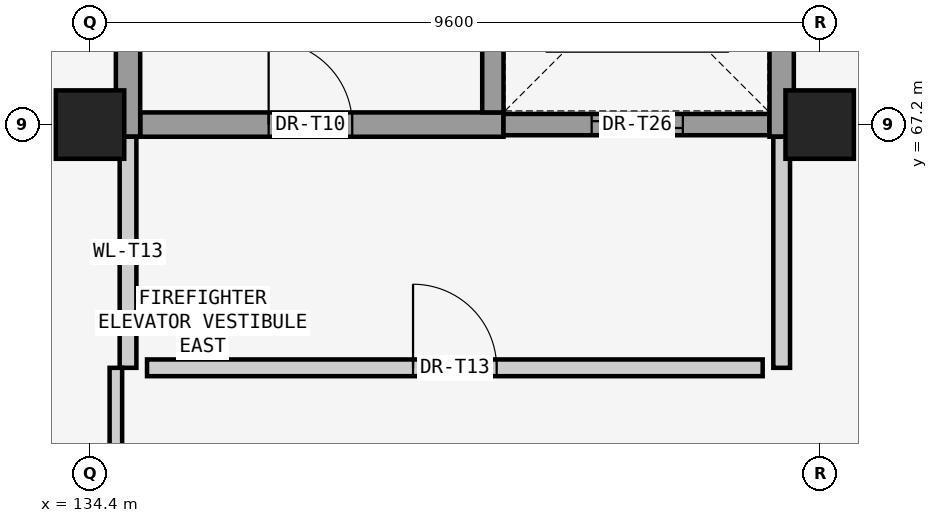
"""IFC4 building model, lengths in metres.
Left out: names, types, materials, properties, quantities, classifications, styles, units other than length and angle.
Written with IfcOpenShell. Run it as: python <this file> out.ifc"""

import sys

from ifc_helpers import new_model, si_unit, direction, frame, frame_2d, origin, origin_2d, place, context, subcontext, project, spatial, rectangle, extrude, element, fill, save


model = new_model("IFC4")
c1 = context("Model", 3, precision=1e-05, world=origin(), true_north=direction((0.0, 1.0)))
c2 = subcontext(c1, "Body", "Model", "MODEL_VIEW")
j1 = project(units=[si_unit("LENGTHUNIT", "METRE"), si_unit("PLANEANGLEUNIT", "RADIAN")], contexts=[c1])
p1 = place(None, origin())
s1 = spatial("IfcSite", under=j1, at=p1, CompositionType="ELEMENT")
p2 = place(p1, origin())
s2 = spatial("IfcBuilding", under=s1, at=p2, CompositionType="ELEMENT")
p3 = place(p2, frame((0.0, 0.0, -4.8)))
s3 = spatial("IfcBuildingStorey", under=s2, at=p3, CompositionType="ELEMENT", Elevation=-4.8)
for number, where, z_axis, x_axis in (
    (1, (134.4, 67.2, 0.0), (0.0, 0.0, 1.0), (1.0, 0.0, 0.0)),
    (2, (144.0, 67.2, 0.0), (0.0, 0.0, 1.0), (1.0, 0.0, 0.0)),
):
    element("IfcColumn", number, at=place(p3, frame(where, z_axis=z_axis, x_axis=x_axis)), inside=s3, PredefinedType="COLUMN", context=c2, shape_type="SweptSolid", body=[
        extrude(rectangle(XDim=0.9, YDim=0.9, at=origin_2d()), origin(), (0.0, 0.0, 1.0), 4.38),
    ])
p4 = place(p3, frame((135.06, 67.2, 0.0), z_axis=(0.0, 0.0, 1.0), x_axis=(1.0, 0.0, 0.0)))
e3 = element("IfcWall", 3, at=p4, inside=s3, PredefinedType="SHEAR", context=c2, shape_type="SweptSolid", body=[
    extrude(rectangle(XDim=4.78, YDim=0.32, at=frame_2d((2.39, 0.0))), origin(), (0.0, 0.0, 1.0), 4.36),
])
p5 = place(p4, frame((1.69, 0.0, 0.0)))
e4 = element("IfcOpeningElement", 4, at=p5, cuts=e3, PredefinedType="OPENING", context=c2, shape_type="SweptSolid", body=[
    extrude(rectangle(XDim=1.1, YDim=2.2, at=frame_2d((0.55, 1.1))), frame((0.0, 0.17, 0.0), z_axis=(0.0, -1.0, 0.0), x_axis=(1.0, 0.0, 0.0)), (0.0, 0.0, 1.0), 0.34),
])
p6 = place(p3, frame((139.84, 67.2, 0.0), z_axis=(0.0, 0.0, 1.0), x_axis=(1.0, 0.0, 0.0)))
e5 = element("IfcWall", 5, at=p6, inside=s3, PredefinedType="SHEAR", context=c2, shape_type="SweptSolid", body=[
    extrude(rectangle(XDim=3.5, YDim=0.28, at=frame_2d((1.75, 0.0))), origin(), (0.0, 0.0, 1.0), 4.36),
])
p7 = place(p6, frame((1.16, 0.0, 0.0)))
e6 = element("IfcOpeningElement", 6, at=p7, cuts=e5, PredefinedType="OPENING", context=c2, shape_type="SweptSolid", body=[
    extrude(rectangle(XDim=1.2, YDim=2.2, at=frame_2d((0.6, 1.1))), frame((0.0, 0.15, 0.0), z_axis=(0.0, -1.0, 0.0), x_axis=(1.0, 0.0, 0.0)), (0.0, 0.0, 1.0), 0.3),
])
for number, where, z_axis, x_axis in (
    (7, (134.9, 75.4, 0.0), (0.0, 0.0, 1.0), (0.0, -1.0, 0.0)),
    (8, (143.5, 67.04, 0.0), (0.0, 0.0, 1.0), (0.0, 1.0, 0.0)),
):
    element("IfcWall", number, at=place(p3, frame(where, z_axis=z_axis, x_axis=x_axis)), inside=s3, PredefinedType="SHEAR", context=c2, shape_type="SweptSolid", body=[
        extrude(rectangle(XDim=8.36, YDim=0.32, at=frame_2d((4.18, 0.0))), origin(), (0.0, 0.0, 1.0), 4.36),
    ])
p8 = place(p3, frame((139.7, 67.36, 0.0), z_axis=(0.0, 0.0, 1.0), x_axis=(0.0, 1.0, 0.0)))
e9 = element("IfcWall", 9, at=p8, inside=s3, PredefinedType="SHEAR", context=c2, shape_type="SweptSolid", body=[
    extrude(rectangle(XDim=7.72, YDim=0.28, at=frame_2d((3.86, 0.0))), origin(), (0.0, 0.0, 1.0), 4.36),
])
for number, where, z_axis, x_axis in (
    (10, (134.9, 64.0, 0.0), (0.0, 0.0, 1.0), (0.0, 1.0, 0.0)),
    (11, (143.5, 64.0, 0.0), (0.0, 0.0, 1.0), (0.0, 1.0, 0.0)),
):
    element("IfcWall", number, at=place(p3, frame(where, z_axis=z_axis, x_axis=x_axis)), inside=s3, PredefinedType="SOLIDWALL", context=c2, shape_type="SweptSolid", body=[
        extrude(rectangle(XDim=3.04, YDim=0.22, at=frame_2d((1.52, 0.0))), origin(), (0.0, 0.0, 1.0), 4.32),
    ])
p9 = place(p3, frame((135.15, 64.0, 0.0), z_axis=(0.0, 0.0, 1.0), x_axis=(1.0, 0.0, 0.0)))
e12 = element("IfcWall", 12, at=p9, inside=s3, PredefinedType="SOLIDWALL", context=c2, shape_type="SweptSolid", body=[
    extrude(rectangle(XDim=8.1, YDim=0.22, at=frame_2d((4.05, 0.0))), origin(), (0.0, 0.0, 1.0), 4.32),
])
p10 = place(p9, frame((3.5, 0.0, 0.0)))
e13 = element("IfcOpeningElement", 13, at=p10, cuts=e12, PredefinedType="OPENING", context=c2, shape_type="SweptSolid", body=[
    extrude(rectangle(XDim=1.1, YDim=2.2, at=frame_2d((0.55, 1.1))), frame((0.0, 0.12, 0.0), z_axis=(0.0, -1.0, 0.0), x_axis=(1.0, 0.0, 0.0)), (0.0, 0.0, 1.0), 0.24),
])
p11 = place(p3, frame((134.74, 60.4, 0.0), z_axis=(0.0, 0.0, 1.0), x_axis=(0.0, 1.0, 0.0)))
e14 = element("IfcWall", 14, at=p11, inside=s3, PredefinedType="PARTITIONING", context=c2, shape_type="SweptSolid", body=[
    extrude(rectangle(XDim=3.6, YDim=0.165, at=frame_2d((1.8, 0.0))), origin(), (0.0, 0.0, 1.0), 4.33),
])
p12 = place(p5, origin())
e15 = element("IfcDoor", 15, at=p12, inside=s3, OperationType="SINGLE_SWING_LEFT", PredefinedType="DOOR", context=c2, shape_type="SweptSolid", body=[
    extrude(rectangle(XDim=1.1, YDim=2.2, at=frame_2d((0.55, 1.1))), frame((0.0, 0.025, 0.0), z_axis=(0.0, -1.0, 0.0), x_axis=(1.0, 0.0, 0.0)), (0.0, 0.0, 1.0), 0.05),
])
fill(e4, e15)
p13 = place(p7, origin())
e16 = element("IfcDoor", 16, at=p13, inside=s3, OperationType="SLIDING_TO_RIGHT", PredefinedType="DOOR", context=c2, shape_type="SweptSolid", body=[
    extrude(rectangle(XDim=1.2, YDim=2.2, at=frame_2d((0.6, 1.1))), frame((0.0, 0.025, 0.0), z_axis=(0.0, -1.0, 0.0), x_axis=(1.0, 0.0, 0.0)), (0.0, 0.0, 1.0), 0.05),
])
fill(e6, e16)
p14 = place(p10, origin())
e17 = element("IfcDoor", 17, at=p14, inside=s3, OperationType="SINGLE_SWING_LEFT", PredefinedType="DOOR", context=c2, shape_type="SweptSolid", body=[
    extrude(rectangle(XDim=1.1, YDim=2.2, at=frame_2d((0.55, 1.1))), frame((0.0, 0.025, 0.0), z_axis=(0.0, -1.0, 0.0), x_axis=(1.0, 0.0, 0.0)), (0.0, 0.0, 1.0), 0.05),
])
fill(e13, e17)
save(model, sys.argv[1])
